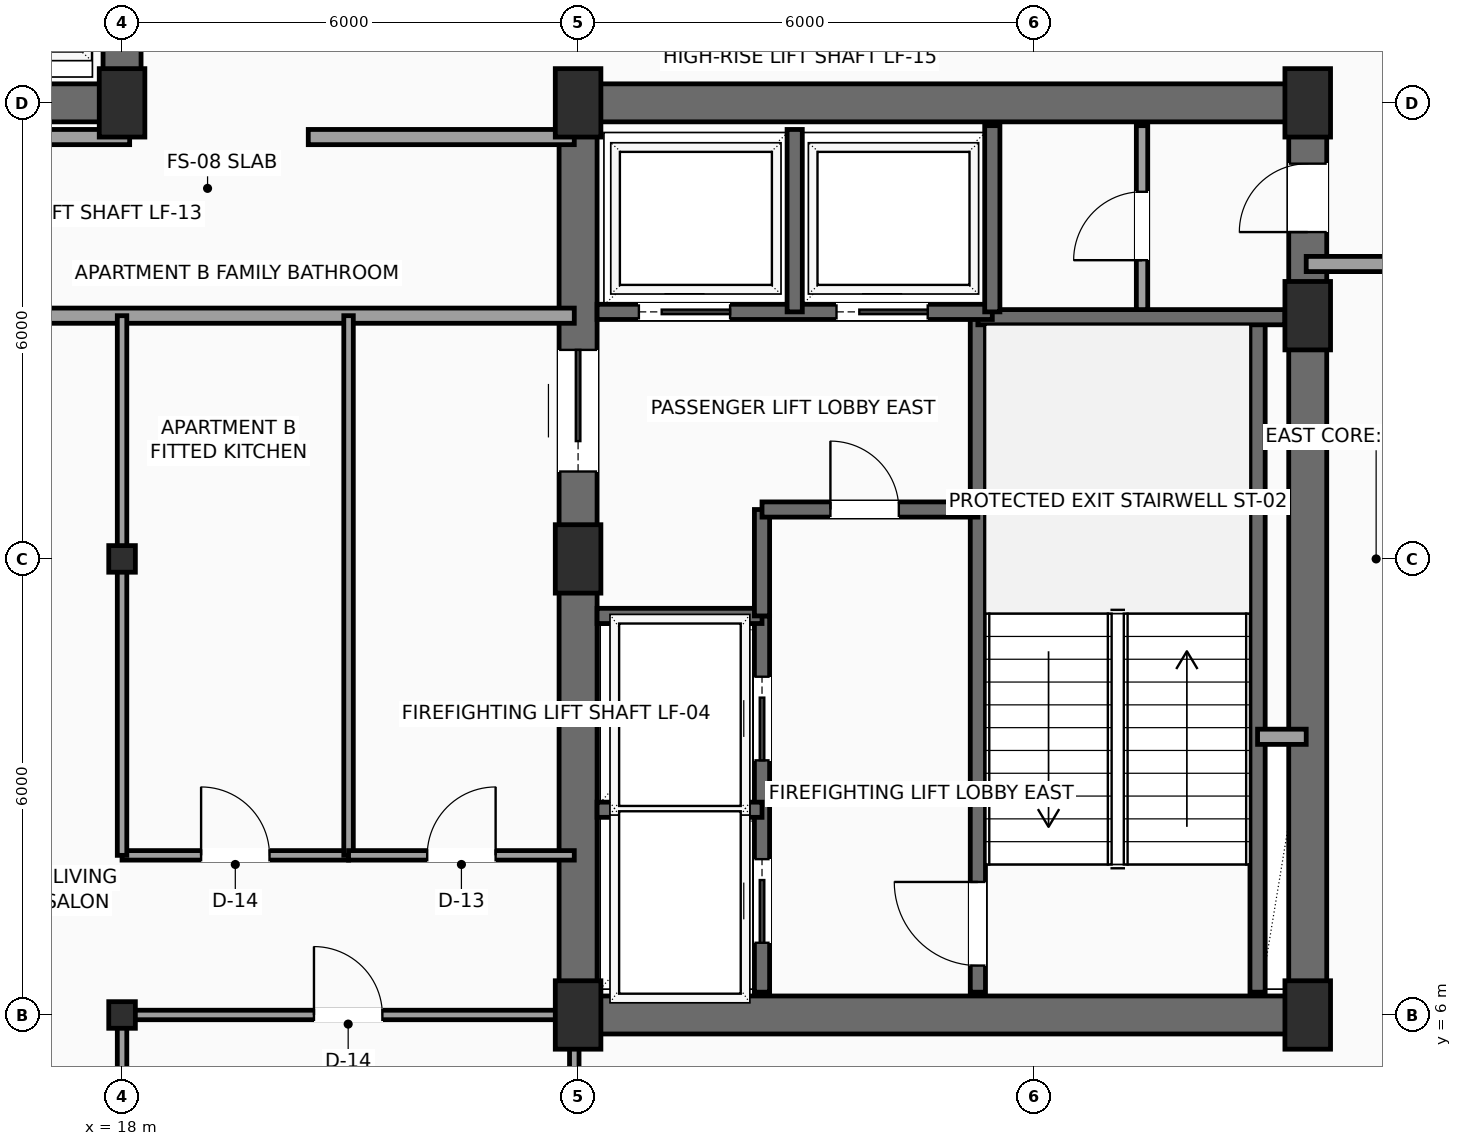
"""IFC4 building model, lengths in metres.
Left out: names, types, materials, properties, quantities, classifications, styles, units other than length and angle.
Written with IfcOpenShell. Run it as: python <this file> out.ifc"""

import sys

from ifc_helpers import new_model, si_unit, direction, frame, frame_2d, origin, origin_2d, place, context, subcontext, project, spatial, rectangle, hollow_rectangle, extrude, element, fill, save


model = new_model("IFC4")
c1 = context("Model", 3, precision=1e-05, world=origin(), true_north=direction((0.0, 1.0)))
c2 = subcontext(c1, "Body", "Model", "MODEL_VIEW")
j1 = project(units=[si_unit("LENGTHUNIT", "METRE"), si_unit("PLANEANGLEUNIT", "RADIAN")], contexts=[c1])
p1 = place(None, origin())
s1 = spatial("IfcSite", under=j1, at=p1, CompositionType="ELEMENT")
p2 = place(p1, origin())
s2 = spatial("IfcBuilding", under=s1, at=p2, CompositionType="ELEMENT")
p3 = place(p2, frame((0.0, 0.0, 253.7)))
s3 = spatial("IfcBuildingStorey", under=s2, at=p3, CompositionType="ELEMENT", Elevation=253.7)
for number, where, z_axis, x_axis in (
    (1, (18.0, 18.0, 0.0), (0.0, 0.0, 1.0), (1.0, 0.0, 0.0)),
    (2, (24.0, 6.0, 0.0), (0.0, 0.0, 1.0), (1.0, 0.0, 0.0)),
    (3, (24.0, 12.0, 0.0), (0.0, 0.0, 1.0), (1.0, 0.0, 0.0)),
    (4, (24.0, 18.0, 0.0), (0.0, 0.0, 1.0), (1.0, 0.0, 0.0)),
    (5, (33.6, 6.0, 0.0), (0.0, 0.0, 1.0), (1.0, 0.0, 0.0)),
    (6, (33.6, 15.2, 0.0), (0.0, 0.0, 1.0), (1.0, 0.0, 0.0)),
    (7, (33.6, 18.0, 0.0), (0.0, 0.0, 1.0), (1.0, 0.0, 0.0)),
):
    element("IfcColumn", number, at=place(p3, frame(where, z_axis=z_axis, x_axis=x_axis)), inside=s3, PredefinedType="COLUMN", context=c2, shape_type="SweptSolid", body=[
        extrude(rectangle(XDim=0.6, YDim=0.9, at=origin_2d()), origin(), (0.0, 0.0, 1.0), 3.5),
    ])
for number, where, z_axis, x_axis in (
    (8, (18.0, 6.0, 0.0), (0.0, 0.0, 1.0), (1.0, 0.0, 0.0)),
    (9, (18.0, 12.0, 0.0), (0.0, 0.0, 1.0), (1.0, 0.0, 0.0)),
):
    element("IfcColumn", number, at=place(p3, frame(where, z_axis=z_axis, x_axis=x_axis)), inside=s3, PredefinedType="COLUMN", context=c2, shape_type="SweptSolid", body=[
        extrude(hollow_rectangle(XDim=0.35, YDim=0.35, WallThickness=0.016, InnerFilletRadius=0.016, OuterFilletRadius=0.032, at=origin_2d()), origin(), (0.0, 0.0, 1.0), 3.5),
    ])
p4 = place(p3, frame((6.0, 18.0, 0.0), z_axis=(0.0, 0.0, 1.0), x_axis=(1.0, 0.0, 0.0)))
e10 = element("IfcWall", 10, at=p4, inside=s3, PredefinedType="SHEAR", context=c2, shape_type="SweptSolid", body=[
    extrude(rectangle(XDim=12.0, YDim=0.5, at=frame_2d((6.0, 0.0))), origin(), (0.0, 0.0, 1.0), 3.3),
])
p5 = place(p4, frame((7.15, 0.0, 0.0)))
e11 = element("IfcOpeningElement", 11, at=p5, cuts=e10, PredefinedType="OPENING", context=c2, shape_type="SweptSolid", body=[
    extrude(rectangle(XDim=1.6, YDim=2.3, at=frame_2d((0.8, 1.15))), frame((0.0, 0.26, 0.0), z_axis=(0.0, -1.0, 0.0), x_axis=(1.0, 0.0, 0.0)), (0.0, 0.0, 1.0), 0.52),
])
for number, where, z_axis, x_axis in (
    (12, (18.0, 18.0, 0.0), (0.0, 0.0, 1.0), (0.0, 1.0, 0.0)),
    (13, (24.0, 6.0, 0.0), (0.0, 0.0, 1.0), (1.0, 0.0, 0.0)),
    (14, (24.0, 18.0, 0.0), (0.0, 0.0, 1.0), (1.0, 0.0, 0.0)),
):
    element("IfcWall", number, at=place(p3, frame(where, z_axis=z_axis, x_axis=x_axis)), inside=s3, PredefinedType="SHEAR", context=c2, shape_type="SweptSolid", body=[
        extrude(rectangle(XDim=9.6, YDim=0.5, at=frame_2d((4.8, 0.0))), origin(), (0.0, 0.0, 1.0), 3.3),
    ])
p6 = place(p3, frame((24.0, 6.0, 0.0), z_axis=(0.0, 0.0, 1.0), x_axis=(0.0, 1.0, 0.0)))
e15 = element("IfcWall", 15, at=p6, inside=s3, PredefinedType="SHEAR", context=c2, shape_type="SweptSolid", body=[
    extrude(rectangle(XDim=12.0, YDim=0.5, at=frame_2d((6.0, 0.0))), origin(), (0.0, 0.0, 1.0), 3.3),
])
p7 = place(p6, frame((7.15, 0.0, 0.0)))
e16 = element("IfcOpeningElement", 16, at=p7, cuts=e15, PredefinedType="OPENING", context=c2, shape_type="SweptSolid", body=[
    extrude(rectangle(XDim=1.6, YDim=2.3, at=frame_2d((0.8, 1.15))), frame((0.0, 0.26, 0.0), z_axis=(0.0, -1.0, 0.0), x_axis=(1.0, 0.0, 0.0)), (0.0, 0.0, 1.0), 0.52),
])
p8 = place(p3, frame((33.6, 6.0, 0.0), z_axis=(0.0, 0.0, 1.0), x_axis=(0.0, 1.0, 0.0)))
e17 = element("IfcWall", 17, at=p8, inside=s3, PredefinedType="SHEAR", context=c2, shape_type="SweptSolid", body=[
    extrude(rectangle(XDim=12.0, YDim=0.5, at=frame_2d((6.0, 0.0))), origin(), (0.0, 0.0, 1.0), 3.3),
])
p9 = place(p8, frame((10.3, 0.0, 0.0)))
e18 = element("IfcOpeningElement", 18, at=p9, cuts=e17, PredefinedType="OPENING", context=c2, shape_type="SweptSolid", body=[
    extrude(rectangle(XDim=0.9, YDim=2.15, at=frame_2d((0.45, 1.075))), frame((0.0, 0.26, 0.0), z_axis=(0.0, -1.0, 0.0), x_axis=(1.0, 0.0, 0.0)), (0.0, 0.0, 1.0), 0.52),
])
p10 = place(p3, frame((29.26, 6.3, 0.0), z_axis=(0.0, 0.0, 1.0), x_axis=(0.0, 1.0, 0.0)))
e19 = element("IfcWall", 19, at=p10, inside=s3, PredefinedType="SHEAR", context=c2, shape_type="SweptSolid", body=[
    extrude(rectangle(XDim=8.88, YDim=0.2, at=frame_2d((4.44, 0.0))), origin(), (0.0, 0.0, 1.0), 3.3),
])
p11 = place(p10, frame((0.35, 0.0, 0.0)))
e20 = element("IfcOpeningElement", 20, at=p11, cuts=e19, PredefinedType="OPENING", context=c2, shape_type="SweptSolid", body=[
    extrude(rectangle(XDim=1.1, YDim=2.2, at=frame_2d((0.55, 1.1))), frame((0.0, 0.11, 0.0), z_axis=(0.0, -1.0, 0.0), x_axis=(1.0, 0.0, 0.0)), (0.0, 0.0, 1.0), 0.22),
])
p12 = place(p3, frame((32.94, 6.3, 0.0), z_axis=(0.0, 0.0, 1.0), x_axis=(0.0, 1.0, 0.0)))
e21 = element("IfcWall", 21, at=p12, inside=s3, PredefinedType="SHEAR", context=c2, shape_type="SweptSolid", body=[
    extrude(rectangle(XDim=8.88, YDim=0.2, at=frame_2d((4.44, 0.0))), origin(), (0.0, 0.0, 1.0), 3.3),
])
p13 = place(p3, frame((29.26, 15.18, 0.0), z_axis=(0.0, 0.0, 1.0), x_axis=(1.0, 0.0, 0.0)))
e22 = element("IfcWall", 22, at=p13, inside=s3, PredefinedType="SHEAR", context=c2, shape_type="SweptSolid", body=[
    extrude(rectangle(XDim=4.04, YDim=0.2, at=frame_2d((2.02, 0.0))), origin(), (0.0, 0.0, 1.0), 3.3),
])
p14 = place(p3, frame((26.42, 6.3, 0.0), z_axis=(0.0, 0.0, 1.0), x_axis=(0.0, 1.0, 0.0)))
e23 = element("IfcWall", 23, at=p14, inside=s3, PredefinedType="SHEAR", context=c2, shape_type="SweptSolid", body=[
    extrude(rectangle(XDim=4.95, YDim=0.2, at=frame_2d((2.475, 0.0))), origin(), (0.0, 0.0, 1.0), 3.3),
])
p15 = place(p14, frame((0.65, 0.0, 0.0)))
e24 = element("IfcOpeningElement", 24, at=p15, cuts=e23, PredefinedType="OPENING", context=c2, shape_type="SweptSolid", body=[
    extrude(rectangle(XDim=1.1, YDim=2.2, at=frame_2d((0.55, 1.1))), frame((0.0, 0.11, 0.0), z_axis=(0.0, -1.0, 0.0), x_axis=(1.0, 0.0, 0.0)), (0.0, 0.0, 1.0), 0.22),
])
p16 = place(p14, frame((3.05, 0.0, 0.0)))
e25 = element("IfcOpeningElement", 25, at=p16, cuts=e23, PredefinedType="OPENING", context=c2, shape_type="SweptSolid", body=[
    extrude(rectangle(XDim=1.1, YDim=2.2, at=frame_2d((0.55, 1.1))), frame((0.0, 0.11, 0.0), z_axis=(0.0, -1.0, 0.0), x_axis=(1.0, 0.0, 0.0)), (0.0, 0.0, 1.0), 0.22),
])
for number, where, z_axis, x_axis in (
    (26, (24.25, 8.7, 0.0), (0.0, 0.0, 1.0), (1.0, 0.0, 0.0)),
    (27, (24.25, 11.25, 0.0), (0.0, 0.0, 1.0), (1.0, 0.0, 0.0)),
):
    element("IfcWall", number, at=place(p3, frame(where, z_axis=z_axis, x_axis=x_axis)), inside=s3, PredefinedType="SHEAR", context=c2, shape_type="SweptSolid", body=[
        extrude(rectangle(XDim=2.17, YDim=0.2, at=frame_2d((1.085, 0.0))), origin(), (0.0, 0.0, 1.0), 3.3),
    ])
p17 = place(p3, frame((26.42, 11.25, 0.0), z_axis=(0.0, 0.0, 1.0), x_axis=(0.0, 1.0, 0.0)))
e28 = element("IfcWall", 28, at=p17, inside=s3, PredefinedType="SHEAR", context=c2, shape_type="SweptSolid", body=[
    extrude(rectangle(XDim=1.4, YDim=0.2, at=frame_2d((0.7, 0.0))), origin(), (0.0, 0.0, 1.0), 3.3),
])
p18 = place(p3, frame((26.42, 12.65, 0.0), z_axis=(0.0, 0.0, 1.0), x_axis=(1.0, 0.0, 0.0)))
e29 = element("IfcWall", 29, at=p18, inside=s3, PredefinedType="SHEAR", context=c2, shape_type="SweptSolid", body=[
    extrude(rectangle(XDim=2.84, YDim=0.2, at=frame_2d((1.42, 0.0))), origin(), (0.0, 0.0, 1.0), 3.3),
])
p19 = place(p18, frame((0.9, 0.0, 0.0)))
e30 = element("IfcOpeningElement", 30, at=p19, cuts=e29, PredefinedType="OPENING", context=c2, shape_type="SweptSolid", body=[
    extrude(rectangle(XDim=0.9, YDim=2.15, at=frame_2d((0.45, 1.075))), frame((0.0, 0.11, 0.0), z_axis=(0.0, -1.0, 0.0), x_axis=(1.0, 0.0, 0.0)), (0.0, 0.0, 1.0), 0.22),
])
p20 = place(p3, frame((32.94, 9.66, 0.0), z_axis=(0.0, 0.0, 1.0), x_axis=(1.0, 0.0, 0.0)))
e31 = element("IfcWall", 31, at=p20, inside=s3, PredefinedType="SOLIDWALL", context=c2, shape_type="SweptSolid", body=[
    extrude(rectangle(XDim=0.64, YDim=0.2, at=frame_2d((0.32, 0.0))), origin(), (0.0, 0.0, 1.0), 3.3),
])
p21 = place(p3, frame((24.25, 15.25, 0.0), z_axis=(0.0, 0.0, 1.0), x_axis=(1.0, 0.0, 0.0)))
e32 = element("IfcWall", 32, at=p21, inside=s3, PredefinedType="SHEAR", context=c2, shape_type="SweptSolid", body=[
    extrude(rectangle(XDim=5.2, YDim=0.2, at=frame_2d((2.6, 0.0))), origin(), (0.0, 0.0, 1.0), 3.3),
])
p22 = place(p21, frame((0.55, 0.0, 0.0)))
e33 = element("IfcOpeningElement", 33, at=p22, cuts=e32, PredefinedType="OPENING", context=c2, shape_type="SweptSolid", body=[
    extrude(rectangle(XDim=1.2, YDim=2.2, at=frame_2d((0.6, 1.1))), frame((0.0, 0.11, 0.0), z_axis=(0.0, -1.0, 0.0), x_axis=(1.0, 0.0, 0.0)), (0.0, 0.0, 1.0), 0.22),
])
p23 = place(p21, frame((3.15, 0.0, 0.0)))
e34 = element("IfcOpeningElement", 34, at=p23, cuts=e32, PredefinedType="OPENING", context=c2, shape_type="SweptSolid", body=[
    extrude(rectangle(XDim=1.2, YDim=2.2, at=frame_2d((0.6, 1.1))), frame((0.0, 0.11, 0.0), z_axis=(0.0, -1.0, 0.0), x_axis=(1.0, 0.0, 0.0)), (0.0, 0.0, 1.0), 0.22),
])
p24 = place(p3, frame((26.85, 15.25, 0.0), z_axis=(0.0, 0.0, 1.0), x_axis=(0.0, 1.0, 0.0)))
e35 = element("IfcWall", 35, at=p24, inside=s3, PredefinedType="SHEAR", context=c2, shape_type="SweptSolid", body=[
    extrude(rectangle(XDim=2.4, YDim=0.2, at=frame_2d((1.2, 0.0))), origin(), (0.0, 0.0, 1.0), 3.3),
])
p25 = place(p3, frame((29.45, 15.25, 0.0), z_axis=(0.0, 0.0, 1.0), x_axis=(0.0, 1.0, 0.0)))
e36 = element("IfcWall", 36, at=p25, inside=s3, PredefinedType="SHEAR", context=c2, shape_type="SweptSolid", body=[
    extrude(rectangle(XDim=2.45, YDim=0.2, at=frame_2d((1.225, 0.0))), origin(), (0.0, 0.0, 1.0), 3.3),
])
p26 = place(p3, frame((31.42, 15.28, 0.0), z_axis=(0.0, 0.0, 1.0), x_axis=(0.0, 1.0, 0.0)))
e37 = element("IfcWall", 37, at=p26, inside=s3, PredefinedType="PARTITIONING", context=c2, shape_type="SweptSolid", body=[
    extrude(rectangle(XDim=2.42, YDim=0.15, at=frame_2d((1.21, 0.0))), origin(), (0.0, 0.0, 1.0), 3.3),
])
p27 = place(p26, frame((0.65, 0.0, 0.0)))
e38 = element("IfcOpeningElement", 38, at=p27, cuts=e37, PredefinedType="OPENING", context=c2, shape_type="SweptSolid", body=[
    extrude(rectangle(XDim=0.9, YDim=2.15, at=frame_2d((0.45, 1.075))), frame((0.0, 0.085, 0.0), z_axis=(0.0, -1.0, 0.0), x_axis=(1.0, 0.0, 0.0)), (0.0, 0.0, 1.0), 0.17),
])
p28 = place(p3, frame((14.95, 17.55, 0.0), z_axis=(0.0, 0.0, 1.0), x_axis=(1.0, 0.0, 0.0)))
e39 = element("IfcWall", 39, at=p28, inside=s3, PredefinedType="SOLIDWALL", context=c2, shape_type="SweptSolid", body=[
    extrude(rectangle(XDim=3.15, YDim=0.2, at=frame_2d((1.575, 0.0))), origin(), (0.0, 0.0, 1.0), 3.3),
])
p29 = place(p3, frame((35.7, 15.88, 0.0), z_axis=(0.0, 0.0, 1.0), x_axis=(-1.0, 0.0, 0.0)))
e40 = element("IfcWall", 40, at=p29, inside=s3, PredefinedType="SOLIDWALL", context=c2, shape_type="SweptSolid", body=[
    extrude(rectangle(XDim=2.12, YDim=0.2, at=frame_2d((1.06, 0.0))), origin(), (0.0, 0.0, 1.0), 3.3),
])
p30 = place(p3, frame((20.45, 17.55, 0.0), z_axis=(0.0, 0.0, 1.0), x_axis=(1.0, 0.0, 0.0)))
e41 = element("IfcWall", 41, at=p30, inside=s3, PredefinedType="SOLIDWALL", context=c2, shape_type="SweptSolid", body=[
    extrude(rectangle(XDim=3.5, YDim=0.2, at=frame_2d((1.75, 0.0))), origin(), (0.0, 0.0, 1.0), 3.3),
])
p31 = place(p3, frame((23.95, 15.2, 0.0), z_axis=(0.0, 0.0, 1.0), x_axis=(-1.0, 0.0, 0.0)))
e42 = element("IfcWall", 42, at=p31, inside=s3, PredefinedType="SOLIDWALL", context=c2, shape_type="SweptSolid", body=[
    extrude(rectangle(XDim=9.0, YDim=0.2, at=frame_2d((4.5, 0.0))), origin(), (0.0, 0.0, 1.0), 2.932),
])
p32 = place(p31, frame((6.925, 0.0, 0.0)))
e43 = element("IfcOpeningElement", 43, at=p32, cuts=e42, PredefinedType="OPENING", context=c2, shape_type="SweptSolid", body=[
    extrude(rectangle(XDim=1.0, YDim=2.2, at=frame_2d((0.5, 1.1))), frame((0.0, 0.11, 0.0), z_axis=(0.0, -1.0, 0.0), x_axis=(1.0, 0.0, 0.0)), (0.0, 0.0, 1.0), 0.22),
])
p33 = place(p3, frame((18.0, 8.1, 0.0), z_axis=(0.0, 0.0, 1.0), x_axis=(1.0, 0.0, 0.0)))
e44 = element("IfcWall", 44, at=p33, inside=s3, PredefinedType="PARTITIONING", context=c2, shape_type="SweptSolid", body=[
    extrude(rectangle(XDim=2.98, YDim=0.125, at=frame_2d((1.49, 0.0))), origin(), (0.0, 0.0, 1.0), 3.3),
])
p34 = place(p33, frame((1.04, 0.0, 0.0)))
e45 = element("IfcOpeningElement", 45, at=p34, cuts=e44, PredefinedType="OPENING", context=c2, shape_type="SweptSolid", body=[
    extrude(rectangle(XDim=0.9, YDim=2.1, at=frame_2d((0.45, 1.05))), frame((0.0, 0.073, 0.0), z_axis=(0.0, -1.0, 0.0), x_axis=(1.0, 0.0, 0.0)), (0.0, 0.0, 1.0), 0.145),
])
p35 = place(p3, frame((18.0, 8.1, 0.0), z_axis=(0.0, 0.0, 1.0), x_axis=(0.0, 1.0, 0.0)))
e46 = element("IfcWall", 46, at=p35, inside=s3, PredefinedType="PARTITIONING", context=c2, shape_type="SweptSolid", body=[
    extrude(rectangle(XDim=7.1, YDim=0.125, at=frame_2d((3.55, 0.0))), origin(), (0.0, 0.0, 1.0), 2.992),
])
p36 = place(p3, frame((20.98, 8.1, 0.0), z_axis=(0.0, 0.0, 1.0), x_axis=(0.0, 1.0, 0.0)))
e47 = element("IfcWall", 47, at=p36, inside=s3, PredefinedType="PARTITIONING", context=c2, shape_type="SweptSolid", body=[
    extrude(rectangle(XDim=7.1, YDim=0.125, at=frame_2d((3.55, 0.0))), origin(), (0.0, 0.0, 1.0), 3.3),
])
p37 = place(p3, frame((20.98, 8.1, 0.0), z_axis=(0.0, 0.0, 1.0), x_axis=(1.0, 0.0, 0.0)))
e48 = element("IfcWall", 48, at=p37, inside=s3, PredefinedType="PARTITIONING", context=c2, shape_type="SweptSolid", body=[
    extrude(rectangle(XDim=2.97, YDim=0.125, at=frame_2d((1.485, 0.0))), origin(), (0.0, 0.0, 1.0), 3.3),
])
p38 = place(p37, frame((1.035, 0.0, 0.0)))
e49 = element("IfcOpeningElement", 49, at=p38, cuts=e48, PredefinedType="OPENING", context=c2, shape_type="SweptSolid", body=[
    extrude(rectangle(XDim=0.9, YDim=2.1, at=frame_2d((0.45, 1.05))), frame((0.0, 0.073, 0.0), z_axis=(0.0, -1.0, 0.0), x_axis=(1.0, 0.0, 0.0)), (0.0, 0.0, 1.0), 0.145),
])
p39 = place(p3, frame((18.0, 6.0, 0.0), z_axis=(0.0, 0.0, 1.0), x_axis=(1.0, 0.0, 0.0)))
e50 = element("IfcWall", 50, at=p39, inside=s3, PredefinedType="PARTITIONING", context=c2, shape_type="SweptSolid", body=[
    extrude(rectangle(XDim=5.95, YDim=0.125, at=frame_2d((2.975, 0.0))), origin(), (0.0, 0.0, 1.0), 2.992),
])
p40 = place(p39, frame((2.525, 0.0, 0.0)))
e51 = element("IfcOpeningElement", 51, at=p40, cuts=e50, PredefinedType="OPENING", context=c2, shape_type="SweptSolid", body=[
    extrude(rectangle(XDim=0.9, YDim=2.1, at=frame_2d((0.45, 1.05))), frame((0.0, 0.073, 0.0), z_axis=(0.0, -1.0, 0.0), x_axis=(1.0, 0.0, 0.0)), (0.0, 0.0, 1.0), 0.145),
])
p41 = place(p3, frame((18.0, 0.3, 0.0), z_axis=(0.0, 0.0, 1.0), x_axis=(0.0, 1.0, 0.0)))
e52 = element("IfcWall", 52, at=p41, inside=s3, PredefinedType="PARTITIONING", context=c2, shape_type="SweptSolid", body=[
    extrude(rectangle(XDim=5.7, YDim=0.125, at=frame_2d((2.85, 0.0))), origin(), (0.0, 0.0, 1.0), 2.992),
])
p42 = place(p3, frame((23.95, 0.3, 0.0), z_axis=(0.0, 0.0, 1.0), x_axis=(0.0, 1.0, 0.0)))
e53 = element("IfcWall", 53, at=p42, inside=s3, PredefinedType="PARTITIONING", context=c2, shape_type="SweptSolid", body=[
    extrude(rectangle(XDim=5.7, YDim=0.125, at=frame_2d((2.85, 0.0))), origin(), (0.0, 0.0, 1.0), 2.967),
])
p43 = place(p7, origin())
e54 = element("IfcDoor", 54, at=p43, inside=s3, OperationType="DOUBLE_DOOR_SLIDING", PredefinedType="DOOR", context=c2, shape_type="SweptSolid", body=[
    extrude(rectangle(XDim=1.6, YDim=2.3, at=frame_2d((0.8, 1.15))), frame((0.0, 0.025, 0.0), z_axis=(0.0, -1.0, 0.0), x_axis=(1.0, 0.0, 0.0)), (0.0, 0.0, 1.0), 0.05),
])
fill(e16, e54)
p44 = place(p9, origin())
e55 = element("IfcDoor", 55, at=p44, inside=s3, OperationType="SINGLE_SWING_LEFT", PredefinedType="DOOR", context=c2, shape_type="SweptSolid", body=[
    extrude(rectangle(XDim=0.9, YDim=2.15, at=frame_2d((0.45, 1.075))), frame((0.0, 0.025, 0.0), z_axis=(0.0, -1.0, 0.0), x_axis=(1.0, 0.0, 0.0)), (0.0, 0.0, 1.0), 0.05),
])
fill(e18, e55)
p45 = place(p11, origin())
e56 = element("IfcDoor", 56, at=p45, inside=s3, OperationType="SINGLE_SWING_RIGHT", PredefinedType="DOOR", context=c2, shape_type="SweptSolid", body=[
    extrude(rectangle(XDim=1.1, YDim=2.2, at=frame_2d((0.55, 1.1))), frame((0.0, 0.025, 0.0), z_axis=(0.0, -1.0, 0.0), x_axis=(1.0, 0.0, 0.0)), (0.0, 0.0, 1.0), 0.05),
])
fill(e20, e56)
p46 = place(p15, origin())
e57 = element("IfcDoor", 57, at=p46, inside=s3, OperationType="SLIDING_TO_LEFT", PredefinedType="DOOR", context=c2, shape_type="SweptSolid", body=[
    extrude(rectangle(XDim=1.1, YDim=2.2, at=frame_2d((0.55, 1.1))), frame((0.0, 0.025, 0.0), z_axis=(0.0, -1.0, 0.0), x_axis=(1.0, 0.0, 0.0)), (0.0, 0.0, 1.0), 0.05),
])
fill(e24, e57)
p47 = place(p16, origin())
e58 = element("IfcDoor", 58, at=p47, inside=s3, OperationType="SLIDING_TO_LEFT", PredefinedType="DOOR", context=c2, shape_type="SweptSolid", body=[
    extrude(rectangle(XDim=1.1, YDim=2.2, at=frame_2d((0.55, 1.1))), frame((0.0, 0.025, 0.0), z_axis=(0.0, -1.0, 0.0), x_axis=(1.0, 0.0, 0.0)), (0.0, 0.0, 1.0), 0.05),
])
fill(e25, e58)
p48 = place(p19, origin())
e59 = element("IfcDoor", 59, at=p48, inside=s3, OperationType="SINGLE_SWING_LEFT", PredefinedType="DOOR", context=c2, shape_type="SweptSolid", body=[
    extrude(rectangle(XDim=0.9, YDim=2.15, at=frame_2d((0.45, 1.075))), frame((0.0, 0.025, 0.0), z_axis=(0.0, -1.0, 0.0), x_axis=(1.0, 0.0, 0.0)), (0.0, 0.0, 1.0), 0.05),
])
fill(e30, e59)
p49 = place(p22, origin())
e60 = element("IfcDoor", 60, at=p49, inside=s3, OperationType="SLIDING_TO_RIGHT", PredefinedType="DOOR", context=c2, shape_type="SweptSolid", body=[
    extrude(rectangle(XDim=1.2, YDim=2.2, at=frame_2d((0.6, 1.1))), frame((0.0, 0.025, 0.0), z_axis=(0.0, -1.0, 0.0), x_axis=(1.0, 0.0, 0.0)), (0.0, 0.0, 1.0), 0.05),
])
fill(e33, e60)
p50 = place(p23, origin())
e61 = element("IfcDoor", 61, at=p50, inside=s3, OperationType="SLIDING_TO_RIGHT", PredefinedType="DOOR", context=c2, shape_type="SweptSolid", body=[
    extrude(rectangle(XDim=1.2, YDim=2.2, at=frame_2d((0.6, 1.1))), frame((0.0, 0.025, 0.0), z_axis=(0.0, -1.0, 0.0), x_axis=(1.0, 0.0, 0.0)), (0.0, 0.0, 1.0), 0.05),
])
fill(e34, e61)
p51 = place(p27, origin())
e62 = element("IfcDoor", 62, at=p51, inside=s3, OperationType="SINGLE_SWING_LEFT", PredefinedType="DOOR", context=c2, shape_type="SweptSolid", body=[
    extrude(rectangle(XDim=0.9, YDim=2.15, at=frame_2d((0.45, 1.075))), frame((0.0, 0.025, 0.0), z_axis=(0.0, -1.0, 0.0), x_axis=(1.0, 0.0, 0.0)), (0.0, 0.0, 1.0), 0.05),
])
fill(e38, e62)
p52 = place(p34, origin())
e63 = element("IfcDoor", 63, at=p52, inside=s3, OperationType="SINGLE_SWING_LEFT", PredefinedType="DOOR", context=c2, shape_type="SweptSolid", body=[
    extrude(rectangle(XDim=0.9, YDim=2.1, at=frame_2d((0.45, 1.05))), frame((0.0, 0.025, 0.0), z_axis=(0.0, -1.0, 0.0), x_axis=(1.0, 0.0, 0.0)), (0.0, 0.0, 1.0), 0.05),
])
fill(e45, e63)
p53 = place(p38, origin())
e64 = element("IfcDoor", 64, at=p53, inside=s3, OperationType="SINGLE_SWING_RIGHT", PredefinedType="DOOR", context=c2, shape_type="SweptSolid", body=[
    extrude(rectangle(XDim=0.9, YDim=2.1, at=frame_2d((0.45, 1.05))), frame((0.0, 0.025, 0.0), z_axis=(0.0, -1.0, 0.0), x_axis=(1.0, 0.0, 0.0)), (0.0, 0.0, 1.0), 0.05),
])
fill(e49, e64)
p54 = place(p40, origin())
e65 = element("IfcDoor", 65, at=p54, inside=s3, OperationType="SINGLE_SWING_LEFT", PredefinedType="DOOR", context=c2, shape_type="SweptSolid", body=[
    extrude(rectangle(XDim=0.9, YDim=2.1, at=frame_2d((0.45, 1.05))), frame((0.0, 0.025, 0.0), z_axis=(0.0, -1.0, 0.0), x_axis=(1.0, 0.0, 0.0)), (0.0, 0.0, 1.0), 0.05),
])
fill(e51, e65)
save(model, sys.argv[1])
